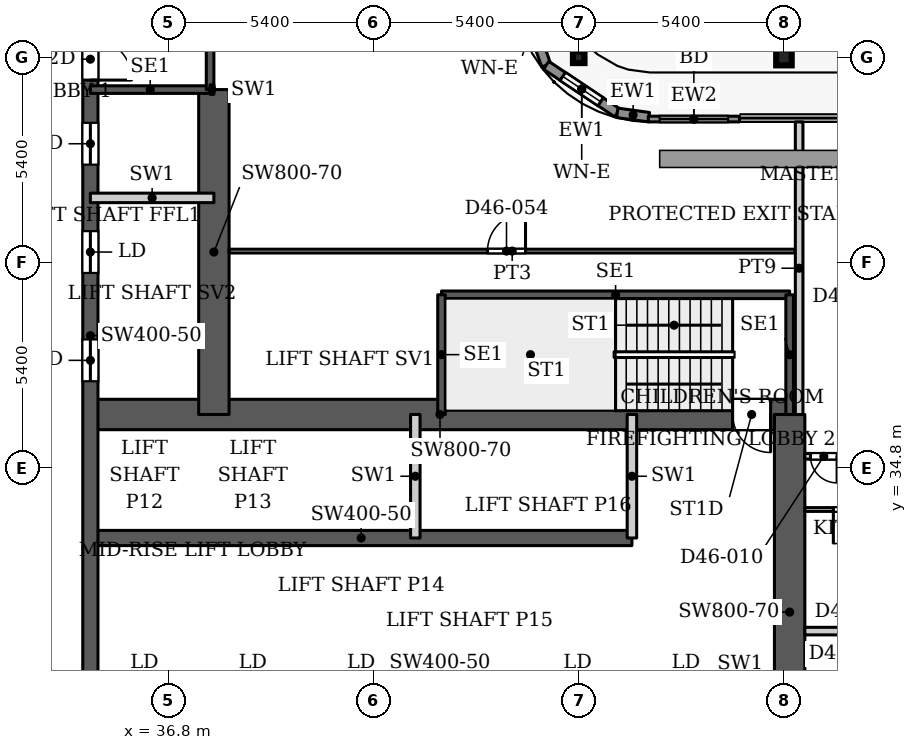
"""IFC4 building model, lengths in metres.
Left out: names, types, materials, properties, quantities, classifications, styles, units other than length and angle.
Written with IfcOpenShell. Run it as: python <this file> out.ifc"""

import sys

from ifc_helpers import new_model, si_unit, direction, frame, frame_2d, origin, origin_2d, place, context, subcontext, project, spatial, rectangle, hollow_rectangle, i_section, extrude, source, transform, mapped, element, fill, save


model = new_model("IFC4")
c1 = context("Model", 3, precision=1e-05, world=origin(), true_north=direction((0.0, 1.0)))
c2 = subcontext(c1, "Body", "Model", "MODEL_VIEW")
j1 = project(units=[si_unit("LENGTHUNIT", "METRE"), si_unit("PLANEANGLEUNIT", "RADIAN")], contexts=[c1])
p1 = place(None, origin())
s1 = spatial("IfcSite", under=j1, at=p1, CompositionType="ELEMENT")
p2 = place(p1, origin())
s2 = spatial("IfcBuilding", under=s1, at=p2, CompositionType="ELEMENT")
p3 = place(p2, frame((0.0, 0.0, 195.5)))
s3 = spatial("IfcBuildingStorey", under=s2, at=p3, CompositionType="ELEMENT", Elevation=195.5)
p4 = place(p3, frame((53.0, 45.6, 0.0), z_axis=(0.0, 0.0, 1.0), x_axis=(1.0, 0.0, 0.0)))
e1 = element("IfcColumn", 1, at=p4, inside=s3, PredefinedType="COLUMN", context=c2, shape_type="SweptSolid", body=[
    extrude(i_section(OverallWidth=0.409, OverallDepth=0.425, WebThickness=0.033, FlangeThickness=0.052, FilletRadius=0.013, at=origin_2d()), origin(), (0.0, 0.0, 1.0), 3.9),
])
p5 = place(p3, frame((47.6, 45.6, 0.0), z_axis=(0.0, 0.0, 1.0), x_axis=(1.0, 0.0, 0.0)))
e2 = element("IfcColumn", 2, at=p5, inside=s3, PredefinedType="COLUMN", context=c2, shape_type="SweptSolid", body=[
    extrude(hollow_rectangle(XDim=0.305, YDim=0.305, WallThickness=0.016, InnerFilletRadius=0.016, OuterFilletRadius=0.032, at=origin_2d()), origin(), (0.0, 0.0, 1.0), 3.9),
])
p6 = place(p3, frame((34.75, 32.95, 0.0), z_axis=(0.0, 0.0, 1.0), x_axis=(1.0, 0.0, 0.0)))
e3 = element("IfcWall", 3, at=p6, inside=s3, PredefinedType="SHEAR", context=c2, shape_type="SweptSolid", body=[
    extrude(rectangle(XDim=14.25, YDim=0.4, at=frame_2d((7.125, 0.0))), origin(), (0.0, 0.0, 1.0), 3.9),
])
p7 = place(p3, frame((34.75, 36.2, 0.0), z_axis=(0.0, 0.0, 1.0), x_axis=(1.0, 0.0, 0.0)))
e4 = element("IfcWall", 4, at=p7, inside=s3, PredefinedType="SHEAR", context=c2, shape_type="SweptSolid", body=[
    extrude(rectangle(XDim=18.4, YDim=0.8, at=frame_2d((9.2, 0.0))), origin(), (0.0, 0.0, 1.0), 3.9),
])
p8 = place(p7, frame((16.9, 0.0, 0.0)))
e5 = element("IfcOpeningElement", 5, at=p8, cuts=e4, PredefinedType="OPENING", context=c2, shape_type="SweptSolid", body=[
    extrude(rectangle(XDim=1.0, YDim=2.2, at=frame_2d((0.5, 1.1))), frame((0.0, 0.41, 0.0), z_axis=(0.0, -1.0, 0.0), x_axis=(1.0, 0.0, 0.0)), (0.0, 0.0, 1.0), 0.82),
])
p9 = place(p3, frame((34.75, 29.05, 0.0), z_axis=(0.0, 0.0, 1.0), x_axis=(0.0, 1.0, 0.0)))
e6 = element("IfcWall", 6, at=p9, inside=s3, PredefinedType="SHEAR", context=c2, shape_type="SweptSolid", body=[
    extrude(rectangle(XDim=18.45, YDim=0.4, at=frame_2d((9.225, 0.0))), origin(), (0.0, 0.0, 1.0), 3.9),
])
p10 = place(p9, frame((8.025, 0.0, 0.0)))
e7 = element("IfcOpeningElement", 7, at=p10, cuts=e6, PredefinedType="OPENING", context=c2, shape_type="SweptSolid", body=[
    extrude(rectangle(XDim=1.1, YDim=2.2, at=frame_2d((0.55, 1.1))), frame((0.0, 0.21, 0.0), z_axis=(0.0, -1.0, 0.0), x_axis=(1.0, 0.0, 0.0)), (0.0, 0.0, 1.0), 0.42),
])
p11 = place(p9, frame((10.875, 0.0, 0.0)))
e8 = element("IfcOpeningElement", 8, at=p11, cuts=e6, PredefinedType="OPENING", context=c2, shape_type="SweptSolid", body=[
    extrude(rectangle(XDim=1.1, YDim=2.2, at=frame_2d((0.55, 1.1))), frame((0.0, 0.21, 0.0), z_axis=(0.0, -1.0, 0.0), x_axis=(1.0, 0.0, 0.0)), (0.0, 0.0, 1.0), 0.42),
])
p12 = place(p9, frame((13.725, 0.0, 0.0)))
e9 = element("IfcOpeningElement", 9, at=p12, cuts=e6, PredefinedType="OPENING", context=c2, shape_type="SweptSolid", body=[
    extrude(rectangle(XDim=1.1, YDim=2.2, at=frame_2d((0.55, 1.1))), frame((0.0, 0.21, 0.0), z_axis=(0.0, -1.0, 0.0), x_axis=(1.0, 0.0, 0.0)), (0.0, 0.0, 1.0), 0.42),
])
p13 = place(p9, frame((15.95, 0.0, 0.0)))
e10 = element("IfcOpeningElement", 10, at=p13, cuts=e6, PredefinedType="OPENING", context=c2, shape_type="SweptSolid", body=[
    extrude(rectangle(XDim=1.1, YDim=2.2, at=frame_2d((0.55, 1.1))), frame((0.0, 0.21, 0.0), z_axis=(0.0, -1.0, 0.0), x_axis=(1.0, 0.0, 0.0)), (0.0, 0.0, 1.0), 0.42),
])
p14 = place(p3, frame((38.0, 36.2, 0.0), z_axis=(0.0, 0.0, 1.0), x_axis=(0.0, 1.0, 0.0)))
e11 = element("IfcWall", 11, at=p14, inside=s3, PredefinedType="SHEAR", context=c2, shape_type="SweptSolid", body=[
    extrude(rectangle(XDim=8.55, YDim=0.8, at=frame_2d((4.275, 0.0))), origin(), (0.0, 0.0, 1.0), 3.9),
])
p15 = place(p3, frame((53.15, 25.8, 0.0), z_axis=(0.0, 0.0, 1.0), x_axis=(0.0, 1.0, 0.0)))
e12 = element("IfcWall", 12, at=p15, inside=s3, PredefinedType="SHEAR", context=c2, shape_type="SweptSolid", body=[
    extrude(rectangle(XDim=10.4, YDim=0.8, at=frame_2d((5.2, 0.0))), origin(), (0.0, 0.0, 1.0), 3.9),
])
p16 = place(p3, frame((46.018, 47.471, 0.0), z_axis=(0.0, 0.0, 1.0), x_axis=(0.328791208903, -0.944402637093, 0.0)))
e13 = element("IfcWall", 13, at=p16, inside=s3, PredefinedType="SOLIDWALL", context=c2, shape_type="SweptSolid", body=[
    extrude(rectangle(XDim=2.205, YDim=0.25, at=frame_2d((1.102, 0.0))), origin(), (0.0, 0.0, 1.0), 3.75),
])
p17 = place(p16, frame((0.503, 0.0, 0.6)))
e14 = element("IfcOpeningElement", 14, at=p17, cuts=e13, PredefinedType="OPENING", context=c2, shape_type="SweptSolid", body=[
    extrude(rectangle(XDim=1.2, YDim=2.1, at=frame_2d((0.6, 1.05))), frame((0.0, 0.135, 0.0), z_axis=(0.0, -1.0, 0.0), x_axis=(1.0, 0.0, 0.0)), (0.0, 0.0, 1.0), 0.27),
])
p18 = place(p3, frame((46.743, 45.389, 0.0), z_axis=(0.0, 0.0, 1.0), x_axis=(0.831449265529, -0.555600682912, 0.0)))
e15 = element("IfcWall", 15, at=p18, inside=s3, PredefinedType="SOLIDWALL", context=c2, shape_type="SweptSolid", body=[
    extrude(rectangle(XDim=2.251, YDim=0.25, at=frame_2d((1.126, 0.0))), origin(), (0.0, 0.0, 1.0), 3.75),
])
p19 = place(p18, frame((0.525, 0.0, 0.6)))
e16 = element("IfcOpeningElement", 16, at=p19, cuts=e15, PredefinedType="OPENING", context=c2, shape_type="SweptSolid", body=[
    extrude(rectangle(XDim=1.2, YDim=2.1, at=frame_2d((0.6, 1.05))), frame((0.0, 0.135, 0.0), z_axis=(0.0, -1.0, 0.0), x_axis=(1.0, 0.0, 0.0)), (0.0, 0.0, 1.0), 0.27),
])
p20 = place(p3, frame((48.615, 44.138, 0.0), z_axis=(0.0, 0.0, 1.0), x_axis=(0.990741504246, -0.135761819977, 0.0)))
e17 = element("IfcWall", 17, at=p20, inside=s3, PredefinedType="SOLIDWALL", context=c2, shape_type="SweptSolid", body=[
    extrude(rectangle(XDim=0.84, YDim=0.25, at=frame_2d((0.42, 0.0))), origin(), (0.0, 0.0, 1.0), 3.75),
])
p21 = place(p3, frame((49.43, 43.975, 0.0), z_axis=(0.0, 0.0, 1.0), x_axis=(1.0, 0.0, 0.0)))
e18 = element("IfcWall", 18, at=p21, inside=s3, PredefinedType="SOLIDWALL", context=c2, shape_type="SweptSolid", body=[
    extrude(rectangle(XDim=2.4, YDim=0.15, at=frame_2d((1.2, 0.0))), origin(), (0.0, 0.0, 1.0), 3.75),
])
p22 = place(p21, frame((0.3, 0.0, 0.0)))
e19 = element("IfcOpeningElement", 19, at=p22, cuts=e18, PredefinedType="OPENING", context=c2, shape_type="SweptSolid", body=[
    extrude(rectangle(XDim=1.8, YDim=2.4, at=frame_2d((0.9, 1.2))), frame((0.0, 0.085, 0.0), z_axis=(0.0, -1.0, 0.0), x_axis=(1.0, 0.0, 0.0)), (0.0, 0.0, 1.0), 0.17),
])
p23 = place(p3, frame((43.99, 39.35, 0.0), z_axis=(0.0, 0.0, 1.0), x_axis=(1.0, 0.0, 0.0)))
e20 = element("IfcWall", 20, at=p23, inside=s3, PredefinedType="SHEAR", context=c2, shape_type="SweptSolid", body=[
    extrude(rectangle(XDim=9.16, YDim=0.2, at=frame_2d((4.58, 0.0))), origin(), (0.0, 0.0, 1.0), 3.9),
])
for number, where, z_axis, x_axis in (
    (21, (43.99, 36.2, 0.0), (0.0, 0.0, 1.0), (0.0, 1.0, 0.0)),
    (22, (53.15, 36.2, 0.0), (0.0, 0.0, 1.0), (0.0, 1.0, 0.0)),
):
    element("IfcWall", number, at=place(p3, frame(where, z_axis=z_axis, x_axis=x_axis)), inside=s3, PredefinedType="SHEAR", context=c2, shape_type="SweptSolid", body=[
        extrude(rectangle(XDim=3.15, YDim=0.2, at=frame_2d((1.575, 0.0))), origin(), (0.0, 0.0, 1.0), 3.9),
    ])
p24 = place(p3, frame((34.75, 44.75, 0.0), z_axis=(0.0, 0.0, 1.0), x_axis=(1.0, 0.0, 0.0)))
e23 = element("IfcWall", 23, at=p24, inside=s3, PredefinedType="SHEAR", context=c2, shape_type="SweptSolid", body=[
    extrude(rectangle(XDim=3.15, YDim=0.2, at=frame_2d((1.575, 0.0))), origin(), (0.0, 0.0, 1.0), 3.9),
])
p25 = place(p3, frame((37.9, 44.75, 0.0), z_axis=(0.0, 0.0, 1.0), x_axis=(0.0, 1.0, 0.0)))
e24 = element("IfcWall", 24, at=p25, inside=s3, PredefinedType="SHEAR", context=c2, shape_type="SweptSolid", body=[
    extrude(rectangle(XDim=9.16, YDim=0.2, at=frame_2d((4.58, 0.0))), origin(), (0.0, 0.0, 1.0), 3.9),
])
for number, where, z_axis, x_axis in (
    (25, (43.3, 32.95, 0.0), (0.0, 0.0, 1.0), (0.0, 1.0, 0.0)),
    (26, (49.0, 32.95, 0.0), (0.0, 0.0, 1.0), (0.0, 1.0, 0.0)),
    (27, (34.75, 41.9, 0.0), (0.0, 0.0, 1.0), (1.0, 0.0, 0.0)),
):
    element("IfcWall", number, at=place(p3, frame(where, z_axis=z_axis, x_axis=x_axis)), inside=s3, PredefinedType="PARTITIONING", context=c2, shape_type="SweptSolid", body=[
        extrude(rectangle(XDim=3.25, YDim=0.25, at=frame_2d((1.625, 0.0))), origin(), (0.0, 0.0, 1.0), 3.9),
    ])
p26 = place(p3, frame((37.9, 44.75, 0.0), z_axis=(0.0, 0.0, 1.0), x_axis=(1.0, 0.0, 0.0)))
e28 = element("IfcWall", 28, at=p26, inside=s3, PredefinedType="PARTITIONING", context=c2, shape_type="SweptSolid", body=[
    extrude(rectangle(XDim=0.1, YDim=0.25, at=frame_2d((0.05, 0.0))), origin(), (0.0, 0.0, 1.0), 3.9),
])
p27 = place(p3, frame((38.399, 40.5, 0.0), z_axis=(0.0, 0.0, 1.0), x_axis=(1.0, 0.0, 0.0)))
e29 = element("IfcWall", 29, at=p27, inside=s3, PredefinedType="PARTITIONING", context=c2, shape_type="SweptSolid", body=[
    extrude(rectangle(XDim=14.901, YDim=0.1, at=frame_2d((7.451, 0.0))), origin(), (0.0, 0.0, 1.0), 3.6),
])
p28 = place(p27, frame((6.801, 0.0, 0.0)))
e30 = element("IfcOpeningElement", 30, at=p28, cuts=e29, PredefinedType="OPENING", context=c2, shape_type="SweptSolid", body=[
    extrude(rectangle(XDim=1.0, YDim=2.1, at=frame_2d((0.5, 1.05))), frame((0.0, 0.06, 0.0), z_axis=(0.0, -1.0, 0.0), x_axis=(1.0, 0.0, 0.0)), (0.0, 0.0, 1.0), 0.12),
])
p29 = place(p3, frame((53.4, 36.199, 0.0), z_axis=(0.0, 0.0, 1.0), x_axis=(0.0, 1.0, 0.0)))
e31 = element("IfcWall", 31, at=p29, inside=s3, PredefinedType="PARTITIONING", context=c2, shape_type="SweptSolid", body=[
    extrude(rectangle(XDim=7.701, YDim=0.2, at=frame_2d((3.851, 0.0))), origin(), (0.0, 0.0, 1.0), 3.6),
])
p30 = place(p3, frame((53.549, 30.5, 0.0), z_axis=(0.0, 0.0, 1.0), x_axis=(1.0, 0.0, 0.0)))
e32 = element("IfcWall", 32, at=p30, inside=s3, PredefinedType="PARTITIONING", context=c2, shape_type="SweptSolid", body=[
    extrude(rectangle(XDim=44.551, YDim=0.2, at=frame_2d((22.275, 0.0))), origin(), (0.0, 0.0, 1.0), 3.6),
])
p31 = place(p30, frame((5.501, 0.0, 0.0)))
e33 = element("IfcOpeningElement", 33, at=p31, cuts=e32, PredefinedType="OPENING", context=c2, shape_type="SweptSolid", body=[
    extrude(rectangle(XDim=1.0, YDim=2.1, at=frame_2d((0.5, 1.05))), frame((0.0, 0.11, 0.0), z_axis=(0.0, -1.0, 0.0), x_axis=(1.0, 0.0, 0.0)), (0.0, 0.0, 1.0), 0.22),
])
p32 = place(p30, frame((20.201, 0.0, 0.0)))
e34 = element("IfcOpeningElement", 34, at=p32, cuts=e32, PredefinedType="OPENING", context=c2, shape_type="SweptSolid", body=[
    extrude(rectangle(XDim=1.0, YDim=2.1, at=frame_2d((0.5, 1.05))), frame((0.0, 0.11, 0.0), z_axis=(0.0, -1.0, 0.0), x_axis=(1.0, 0.0, 0.0)), (0.0, 0.0, 1.0), 0.22),
])
p33 = place(p30, frame((24.251, 0.0, 0.0)))
e35 = element("IfcOpeningElement", 35, at=p33, cuts=e32, PredefinedType="OPENING", context=c2, shape_type="SweptSolid", body=[
    extrude(rectangle(XDim=1.0, YDim=2.1, at=frame_2d((0.5, 1.05))), frame((0.0, 0.11, 0.0), z_axis=(0.0, -1.0, 0.0), x_axis=(1.0, 0.0, 0.0)), (0.0, 0.0, 1.0), 0.22),
])
p34 = place(p30, frame((40.151, 0.0, 0.0)))
e36 = element("IfcOpeningElement", 36, at=p34, cuts=e32, PredefinedType="OPENING", context=c2, shape_type="SweptSolid", body=[
    extrude(rectangle(XDim=1.0, YDim=2.1, at=frame_2d((0.5, 1.05))), frame((0.0, 0.11, 0.0), z_axis=(0.0, -1.0, 0.0), x_axis=(1.0, 0.0, 0.0)), (0.0, 0.0, 1.0), 0.22),
])
p35 = place(p3, frame((53.549, 33.7, 0.0), z_axis=(0.0, 0.0, 1.0), x_axis=(1.0, 0.0, 0.0)))
e37 = element("IfcWall", 37, at=p35, inside=s3, PredefinedType="PARTITIONING", context=c2, shape_type="SweptSolid", body=[
    extrude(rectangle(XDim=5.001, YDim=0.1, at=frame_2d((2.5, 0.0))), origin(), (0.0, 0.0, 1.0), 3.6),
])
p36 = place(p35, frame((0.751, 0.0, 0.0)))
e38 = element("IfcOpeningElement", 38, at=p36, cuts=e37, PredefinedType="OPENING", context=c2, shape_type="SweptSolid", body=[
    extrude(rectangle(XDim=0.9, YDim=2.1, at=frame_2d((0.45, 1.05))), frame((0.0, 0.06, 0.0), z_axis=(0.0, -1.0, 0.0), x_axis=(1.0, 0.0, 0.0)), (0.0, 0.0, 1.0), 0.12),
])
p37 = place(p35, frame((3.651, 0.0, 0.0)))
e39 = element("IfcOpeningElement", 39, at=p37, cuts=e37, PredefinedType="OPENING", context=c2, shape_type="SweptSolid", body=[
    extrude(rectangle(XDim=0.8, YDim=2.1, at=frame_2d((0.4, 1.05))), frame((0.0, 0.06, 0.0), z_axis=(0.0, -1.0, 0.0), x_axis=(1.0, 0.0, 0.0)), (0.0, 0.0, 1.0), 0.12),
])
p38 = place(p3, frame((53.549, 35.1, 0.0), z_axis=(0.0, 0.0, 1.0), x_axis=(1.0, 0.0, 0.0)))
e40 = element("IfcWall", 40, at=p38, inside=s3, PredefinedType="PARTITIONING", context=c2, shape_type="SweptSolid", body=[
    extrude(rectangle(XDim=13.551, YDim=0.15, at=frame_2d((6.775, 0.0))), origin(), (0.0, 0.0, 1.0), 3.6),
])
p39 = place(p38, frame((3.901, 0.0, 0.0)))
e41 = element("IfcOpeningElement", 41, at=p39, cuts=e40, PredefinedType="OPENING", context=c2, shape_type="SweptSolid", body=[
    extrude(rectangle(XDim=0.9, YDim=2.1, at=frame_2d((0.45, 1.05))), frame((0.0, 0.085, 0.0), z_axis=(0.0, -1.0, 0.0), x_axis=(1.0, 0.0, 0.0)), (0.0, 0.0, 1.0), 0.17),
])
p40 = place(p38, frame((8.701, 0.0, 0.0)))
e42 = element("IfcOpeningElement", 42, at=p40, cuts=e40, PredefinedType="OPENING", context=c2, shape_type="SweptSolid", body=[
    extrude(rectangle(XDim=0.9, YDim=2.1, at=frame_2d((0.45, 1.05))), frame((0.0, 0.085, 0.0), z_axis=(0.0, -1.0, 0.0), x_axis=(1.0, 0.0, 0.0)), (0.0, 0.0, 1.0), 0.17),
])
p41 = place(p38, frame((11.501, 0.0, 0.0)))
e43 = element("IfcOpeningElement", 43, at=p41, cuts=e40, PredefinedType="OPENING", context=c2, shape_type="SweptSolid", body=[
    extrude(rectangle(XDim=1.0, YDim=2.1, at=frame_2d((0.5, 1.05))), frame((0.0, 0.085, 0.0), z_axis=(0.0, -1.0, 0.0), x_axis=(1.0, 0.0, 0.0)), (0.0, 0.0, 1.0), 0.17),
])
p42 = place(p38, frame((6.301, 0.0, 0.0)))
e44 = element("IfcOpeningElement", 44, at=p42, cuts=e40, PredefinedType="OPENING", context=c2, shape_type="SweptSolid", body=[
    extrude(rectangle(XDim=0.9, YDim=2.1, at=frame_2d((0.45, 1.05))), frame((0.0, 0.085, 0.0), z_axis=(0.0, -1.0, 0.0), x_axis=(1.0, 0.0, 0.0)), (0.0, 0.0, 1.0), 0.17),
])
p43 = place(p38, frame((0.15, 0.0, 0.0)))
e45 = element("IfcOpeningElement", 45, at=p43, cuts=e40, PredefinedType="OPENING", context=c2, shape_type="SweptSolid", body=[
    extrude(rectangle(XDim=0.7, YDim=2.1, at=frame_2d((0.35, 1.05))), frame((0.0, 0.085, 0.0), z_axis=(0.0, -1.0, 0.0), x_axis=(1.0, 0.0, 0.0)), (0.0, 0.0, 1.0), 0.17),
])
m1 = source(origin(), c2, "Body", "SweptSolid", [
    extrude(rectangle(XDim=1.2, YDim=2.1, at=frame_2d((0.6, 1.05))), frame((0.0, 0.03, 0.0), z_axis=(0.0, -1.0, 0.0), x_axis=(1.0, 0.0, 0.0)), (0.0, 0.0, 1.0), 0.06),
])
p44 = place(p19, origin())
e46 = element("IfcWindow", 46, at=p44, inside=s3, PartitioningType="SINGLE_PANEL", PredefinedType="WINDOW", context=c2, shape_type="MappedRepresentation", body=[
    mapped(m1, transform((0.0, 0.0, 0.0), x_axis=(1.0, 0.0, 0.0), y_axis=(0.0, 1.0, 0.0), z_axis=(0.0, 0.0, 1.0), scale=1.0)),
])
fill(e16, e46)
m2 = source(origin(), c2, "Body", "SweptSolid", [
    extrude(rectangle(XDim=1.8, YDim=2.4, at=frame_2d((0.9, 1.2))), frame((0.0, 0.025, 0.0), z_axis=(0.0, -1.0, 0.0), x_axis=(1.0, 0.0, 0.0)), (0.0, 0.0, 1.0), 0.05),
])
p45 = place(p22, origin())
e47 = element("IfcDoor", 47, at=p45, inside=s3, OperationType="SLIDING_TO_LEFT", PredefinedType="DOOR", context=c2, shape_type="MappedRepresentation", body=[
    mapped(m2, transform((0.0, 0.0, 0.0), x_axis=(1.0, 0.0, 0.0), y_axis=(0.0, 1.0, 0.0), z_axis=(0.0, 0.0, 1.0), scale=1.0)),
])
fill(e19, e47)
m3 = source(origin(), c2, "Body", "SweptSolid", [
    extrude(rectangle(XDim=1.1, YDim=2.2, at=frame_2d((0.55, 1.1))), frame((0.0, 0.025, 0.0), z_axis=(0.0, -1.0, 0.0), x_axis=(1.0, 0.0, 0.0)), (0.0, 0.0, 1.0), 0.05),
])
p46 = place(p10, origin())
e48 = element("IfcDoor", 48, at=p46, inside=s3, OperationType="SLIDING_TO_LEFT", PredefinedType="DOOR", context=c2, shape_type="MappedRepresentation", body=[
    mapped(m3, transform((0.0, 0.0, 0.0), x_axis=(1.0, 0.0, 0.0), y_axis=(0.0, 1.0, 0.0), z_axis=(0.0, 0.0, 1.0), scale=1.0)),
])
fill(e7, e48)
p47 = place(p11, origin())
e49 = element("IfcDoor", 49, at=p47, inside=s3, OperationType="SLIDING_TO_LEFT", PredefinedType="DOOR", context=c2, shape_type="MappedRepresentation", body=[
    mapped(m3, transform((0.0, 0.0, 0.0), x_axis=(1.0, 0.0, 0.0), y_axis=(0.0, 1.0, 0.0), z_axis=(0.0, 0.0, 1.0), scale=1.0)),
])
fill(e8, e49)
p48 = place(p12, origin())
e50 = element("IfcDoor", 50, at=p48, inside=s3, OperationType="SLIDING_TO_LEFT", PredefinedType="DOOR", context=c2, shape_type="MappedRepresentation", body=[
    mapped(m3, transform((0.0, 0.0, 0.0), x_axis=(1.0, 0.0, 0.0), y_axis=(0.0, 1.0, 0.0), z_axis=(0.0, 0.0, 1.0), scale=1.0)),
])
fill(e9, e50)
m4 = source(origin(), c2, "Body", "SweptSolid", [
    extrude(rectangle(XDim=1.0, YDim=2.2, at=frame_2d((0.5, 1.1))), frame((0.0, 0.025, 0.0), z_axis=(0.0, -1.0, 0.0), x_axis=(1.0, 0.0, 0.0)), (0.0, 0.0, 1.0), 0.05),
])
p49 = place(p8, origin())
e51 = element("IfcDoor", 51, at=p49, inside=s3, OperationType="SINGLE_SWING_RIGHT", PredefinedType="DOOR", context=c2, shape_type="MappedRepresentation", body=[
    mapped(m4, transform((0.0, 0.0, 0.0), x_axis=(1.0, 0.0, 0.0), y_axis=(0.0, 1.0, 0.0), z_axis=(0.0, 0.0, 1.0), scale=1.0)),
])
fill(e5, e51)
m5 = source(origin(), c2, "Body", "SweptSolid", [
    extrude(rectangle(XDim=1.1, YDim=2.2, at=frame_2d((0.55, 1.1))), frame((0.0, 0.025, 0.0), z_axis=(0.0, -1.0, 0.0), x_axis=(1.0, 0.0, 0.0)), (0.0, 0.0, 1.0), 0.05),
])
p50 = place(p13, origin())
e52 = element("IfcDoor", 52, at=p50, inside=s3, OperationType="SINGLE_SWING_RIGHT", PredefinedType="DOOR", context=c2, shape_type="MappedRepresentation", body=[
    mapped(m5, transform((0.0, 0.0, 0.0), x_axis=(1.0, 0.0, 0.0), y_axis=(0.0, 1.0, 0.0), z_axis=(0.0, 0.0, 1.0), scale=1.0)),
])
fill(e10, e52)
m6 = source(origin(), c2, "Body", "SweptSolid", [
    extrude(rectangle(XDim=0.9, YDim=2.1, at=frame_2d((0.45, 1.05))), frame((0.0, 0.025, 0.0), z_axis=(0.0, -1.0, 0.0), x_axis=(1.0, 0.0, 0.0)), (0.0, 0.0, 1.0), 0.05),
])
p51 = place(p36, origin())
e53 = element("IfcDoor", 53, at=p51, inside=s3, OperationType="SINGLE_SWING_RIGHT", PredefinedType="DOOR", context=c2, shape_type="MappedRepresentation", body=[
    mapped(m6, transform((0.0, 0.0, 0.0), x_axis=(1.0, 0.0, 0.0), y_axis=(0.0, 1.0, 0.0), z_axis=(0.0, 0.0, 1.0), scale=1.0)),
])
fill(e38, e53)
m7 = source(origin(), c2, "Body", "SweptSolid", [
    extrude(rectangle(XDim=0.7, YDim=2.1, at=frame_2d((0.35, 1.05))), frame((0.0, 0.025, 0.0), z_axis=(0.0, -1.0, 0.0), x_axis=(1.0, 0.0, 0.0)), (0.0, 0.0, 1.0), 0.05),
])
p52 = place(p43, origin())
e54 = element("IfcDoor", 54, at=p52, inside=s3, OperationType="SINGLE_SWING_RIGHT", PredefinedType="DOOR", context=c2, shape_type="MappedRepresentation", body=[
    mapped(m7, transform((0.0, 0.0, 0.0), x_axis=(1.0, 0.0, 0.0), y_axis=(0.0, 1.0, 0.0), z_axis=(0.0, 0.0, 1.0), scale=1.0)),
])
fill(e45, e54)
m8 = source(origin(), c2, "Body", "SweptSolid", [
    extrude(rectangle(XDim=1.0, YDim=2.1, at=frame_2d((0.5, 1.05))), frame((0.0, 0.025, 0.0), z_axis=(0.0, -1.0, 0.0), x_axis=(1.0, 0.0, 0.0)), (0.0, 0.0, 1.0), 0.05),
])
p53 = place(p28, origin())
e55 = element("IfcDoor", 55, at=p53, inside=s3, OperationType="SINGLE_SWING_LEFT", PredefinedType="DOOR", context=c2, shape_type="MappedRepresentation", body=[
    mapped(m8, transform((0.0, 0.0, 0.0), x_axis=(1.0, 0.0, 0.0), y_axis=(0.0, 1.0, 0.0), z_axis=(0.0, 0.0, 1.0), scale=1.0)),
])
fill(e30, e55)
save(model, sys.argv[1])
